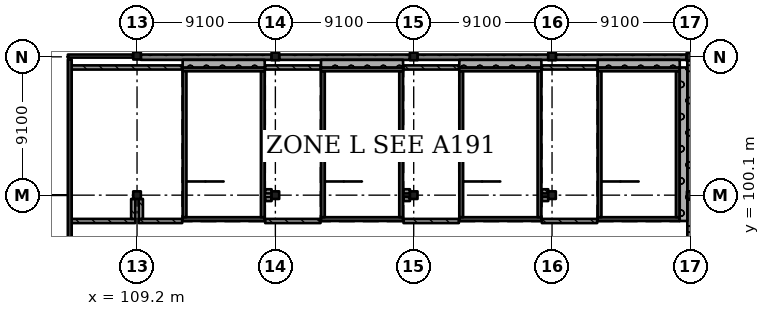
"""IFC4 building model, lengths in metres.
Left out: names, types, materials, properties, quantities, classifications, styles, units other than length and angle.
Written with IfcOpenShell. Run it as: python <this file> out.ifc"""

import sys

from ifc_helpers import new_model, si_unit, direction, frame, frame_2d, origin, origin_2d, place, context, subcontext, project, spatial, rectangle, extrude, element, fill, save


model = new_model("IFC4")
c1 = context("Model", 3, precision=1e-05, world=origin(), true_north=direction((0.0, 1.0)))
c2 = subcontext(c1, "Body", "Model", "MODEL_VIEW")
j1 = project(units=[si_unit("LENGTHUNIT", "METRE"), si_unit("PLANEANGLEUNIT", "RADIAN")], contexts=[c1])
p1 = place(None, origin())
s1 = spatial("IfcSite", under=j1, at=p1, CompositionType="ELEMENT")
p2 = place(p1, origin())
s2 = spatial("IfcBuilding", under=s1, at=p2, CompositionType="ELEMENT")
p3 = place(p2, frame((0.0, 0.0, 29.12)))
s3 = spatial("IfcBuildingStorey", under=s2, at=p3, CompositionType="ELEMENT", Elevation=29.12)
for number, where, z_axis, x_axis in (
    (1, (109.2, 100.1, 0.0), (0.0, 0.0, 1.0), (1.0, 0.0, 0.0)),
    (2, (109.2, 109.275, 0.0), (0.0, 0.0, 1.0), (1.0, 0.0, 0.0)),
    (3, (118.3, 100.1, 0.0), (0.0, 0.0, 1.0), (1.0, 0.0, 0.0)),
    (4, (118.3, 109.225, 0.0), (0.0, 0.0, 1.0), (1.0, 0.0, 0.0)),
    (5, (127.4, 100.1, 0.0), (0.0, 0.0, 1.0), (1.0, 0.0, 0.0)),
    (6, (127.4, 109.225, 0.0), (0.0, 0.0, 1.0), (1.0, 0.0, 0.0)),
    (7, (136.5, 100.1, 0.0), (0.0, 0.0, 1.0), (1.0, 0.0, 0.0)),
    (8, (136.5, 109.225, 0.0), (0.0, 0.0, 1.0), (1.0, 0.0, 0.0)),
    (9, (145.625, 100.1, 0.0), (0.0, 0.0, 1.0), (1.0, 0.0, 0.0)),
    (10, (145.6, 109.2, 0.0), (0.0, 0.0, 1.0), (1.0, 0.0, 0.0)),
):
    element("IfcColumn", number, at=place(p3, frame(where, z_axis=z_axis, x_axis=x_axis)), inside=s3, PredefinedType="COLUMN", context=c2, shape_type="SweptSolid", body=[
        extrude(rectangle(XDim=0.5, YDim=0.5, at=origin_2d()), origin(), (0.0, 0.0, 1.0), 4.55),
    ])
p4 = place(p3, frame((104.775, 68.25, 0.0), z_axis=(0.0, 0.0, 1.0), x_axis=(0.0, 1.0, 0.0)))
e11 = element("IfcWall", 11, at=p4, inside=s3, PredefinedType="SHEAR", context=c2, shape_type="SweptSolid", body=[
    extrude(rectangle(XDim=40.775, YDim=0.25, at=frame_2d((20.387, 0.0))), origin(), (0.0, 0.0, 1.0), 4.55),
])
p5 = place(p3, frame((144.9, 98.525, 0.0), z_axis=(0.0, 0.0, 1.0), x_axis=(-1.0, 0.0, 0.0)))
e12 = element("IfcWall", 12, at=p5, inside=s3, PredefinedType="SHEAR", context=c2, shape_type="SweptSolid", body=[
    extrude(rectangle(XDim=5.4, YDim=0.25, at=frame_2d((2.7, 0.0))), origin(), (0.0, 0.0, 1.0), 4.55),
])
p6 = place(p5, frame((1.5, 0.0, 0.0)))
e13 = element("IfcOpeningElement", 13, at=p6, cuts=e12, PredefinedType="OPENING", context=c2, shape_type="SweptSolid", body=[
    extrude(rectangle(XDim=2.4, YDim=2.1, at=frame_2d((1.2, 1.05))), frame((0.0, 0.135, 0.0), z_axis=(0.0, -1.0, 0.0), x_axis=(1.0, 0.0, 0.0)), (0.0, 0.0, 1.0), 0.27),
])
p7 = place(p3, frame((144.9, 108.375, 0.0), z_axis=(0.0, 0.0, 1.0), x_axis=(-1.0, 0.0, 0.0)))
e14 = element("IfcWall", 14, at=p7, inside=s3, PredefinedType="SHEAR", context=c2, shape_type="SweptSolid", body=[
    extrude(rectangle(XDim=5.4, YDim=0.25, at=frame_2d((2.7, 0.0))), origin(), (0.0, 0.0, 1.0), 4.55),
])
for number, where, z_axis, x_axis in (
    (15, (139.625, 108.25, 0.0), (0.0, 0.0, 1.0), (0.0, -1.0, 0.0)),
    (16, (144.775, 108.25, 0.0), (0.0, 0.0, 1.0), (0.0, -1.0, 0.0)),
):
    element("IfcWall", number, at=place(p3, frame(where, z_axis=z_axis, x_axis=x_axis)), inside=s3, PredefinedType="SHEAR", context=c2, shape_type="SweptSolid", body=[
        extrude(rectangle(XDim=9.6, YDim=0.25, at=frame_2d((4.8, 0.0))), origin(), (0.0, 0.0, 1.0), 4.55),
    ])
p8 = place(p3, frame((135.8, 98.525, 0.0), z_axis=(0.0, 0.0, 1.0), x_axis=(-1.0, 0.0, 0.0)))
e17 = element("IfcWall", 17, at=p8, inside=s3, PredefinedType="SHEAR", context=c2, shape_type="SweptSolid", body=[
    extrude(rectangle(XDim=5.4, YDim=0.25, at=frame_2d((2.7, 0.0))), origin(), (0.0, 0.0, 1.0), 4.55),
])
p9 = place(p8, frame((1.5, 0.0, 0.0)))
e18 = element("IfcOpeningElement", 18, at=p9, cuts=e17, PredefinedType="OPENING", context=c2, shape_type="SweptSolid", body=[
    extrude(rectangle(XDim=2.4, YDim=2.1, at=frame_2d((1.2, 1.05))), frame((0.0, 0.135, 0.0), z_axis=(0.0, -1.0, 0.0), x_axis=(1.0, 0.0, 0.0)), (0.0, 0.0, 1.0), 0.27),
])
p10 = place(p3, frame((135.8, 108.375, 0.0), z_axis=(0.0, 0.0, 1.0), x_axis=(-1.0, 0.0, 0.0)))
e19 = element("IfcWall", 19, at=p10, inside=s3, PredefinedType="SHEAR", context=c2, shape_type="SweptSolid", body=[
    extrude(rectangle(XDim=5.4, YDim=0.25, at=frame_2d((2.7, 0.0))), origin(), (0.0, 0.0, 1.0), 4.55),
])
for number, where, z_axis, x_axis in (
    (20, (130.525, 108.25, 0.0), (0.0, 0.0, 1.0), (0.0, -1.0, 0.0)),
    (21, (135.675, 108.25, 0.0), (0.0, 0.0, 1.0), (0.0, -1.0, 0.0)),
):
    element("IfcWall", number, at=place(p3, frame(where, z_axis=z_axis, x_axis=x_axis)), inside=s3, PredefinedType="SHEAR", context=c2, shape_type="SweptSolid", body=[
        extrude(rectangle(XDim=9.6, YDim=0.25, at=frame_2d((4.8, 0.0))), origin(), (0.0, 0.0, 1.0), 4.55),
    ])
p11 = place(p3, frame((126.7, 98.525, 0.0), z_axis=(0.0, 0.0, 1.0), x_axis=(-1.0, 0.0, 0.0)))
e22 = element("IfcWall", 22, at=p11, inside=s3, PredefinedType="SHEAR", context=c2, shape_type="SweptSolid", body=[
    extrude(rectangle(XDim=5.4, YDim=0.25, at=frame_2d((2.7, 0.0))), origin(), (0.0, 0.0, 1.0), 4.55),
])
p12 = place(p11, frame((1.5, 0.0, 0.0)))
e23 = element("IfcOpeningElement", 23, at=p12, cuts=e22, PredefinedType="OPENING", context=c2, shape_type="SweptSolid", body=[
    extrude(rectangle(XDim=2.4, YDim=2.1, at=frame_2d((1.2, 1.05))), frame((0.0, 0.135, 0.0), z_axis=(0.0, -1.0, 0.0), x_axis=(1.0, 0.0, 0.0)), (0.0, 0.0, 1.0), 0.27),
])
p13 = place(p3, frame((126.7, 108.375, 0.0), z_axis=(0.0, 0.0, 1.0), x_axis=(-1.0, 0.0, 0.0)))
e24 = element("IfcWall", 24, at=p13, inside=s3, PredefinedType="SHEAR", context=c2, shape_type="SweptSolid", body=[
    extrude(rectangle(XDim=5.4, YDim=0.25, at=frame_2d((2.7, 0.0))), origin(), (0.0, 0.0, 1.0), 4.55),
])
for number, where, z_axis, x_axis in (
    (25, (121.425, 108.25, 0.0), (0.0, 0.0, 1.0), (0.0, -1.0, 0.0)),
    (26, (126.575, 108.25, 0.0), (0.0, 0.0, 1.0), (0.0, -1.0, 0.0)),
):
    element("IfcWall", number, at=place(p3, frame(where, z_axis=z_axis, x_axis=x_axis)), inside=s3, PredefinedType="SHEAR", context=c2, shape_type="SweptSolid", body=[
        extrude(rectangle(XDim=9.6, YDim=0.25, at=frame_2d((4.8, 0.0))), origin(), (0.0, 0.0, 1.0), 4.55),
    ])
p14 = place(p3, frame((117.6, 98.525, 0.0), z_axis=(0.0, 0.0, 1.0), x_axis=(-1.0, 0.0, 0.0)))
e27 = element("IfcWall", 27, at=p14, inside=s3, PredefinedType="SHEAR", context=c2, shape_type="SweptSolid", body=[
    extrude(rectangle(XDim=5.4, YDim=0.25, at=frame_2d((2.7, 0.0))), origin(), (0.0, 0.0, 1.0), 4.55),
])
p15 = place(p14, frame((1.5, 0.0, 0.0)))
e28 = element("IfcOpeningElement", 28, at=p15, cuts=e27, PredefinedType="OPENING", context=c2, shape_type="SweptSolid", body=[
    extrude(rectangle(XDim=2.4, YDim=2.1, at=frame_2d((1.2, 1.05))), frame((0.0, 0.135, 0.0), z_axis=(0.0, -1.0, 0.0), x_axis=(1.0, 0.0, 0.0)), (0.0, 0.0, 1.0), 0.27),
])
p16 = place(p3, frame((117.6, 108.375, 0.0), z_axis=(0.0, 0.0, 1.0), x_axis=(-1.0, 0.0, 0.0)))
e29 = element("IfcWall", 29, at=p16, inside=s3, PredefinedType="SHEAR", context=c2, shape_type="SweptSolid", body=[
    extrude(rectangle(XDim=5.4, YDim=0.25, at=frame_2d((2.7, 0.0))), origin(), (0.0, 0.0, 1.0), 4.55),
])
for number, where, z_axis, x_axis in (
    (30, (112.325, 108.25, 0.0), (0.0, 0.0, 1.0), (0.0, -1.0, 0.0)),
    (31, (117.475, 108.25, 0.0), (0.0, 0.0, 1.0), (0.0, -1.0, 0.0)),
):
    element("IfcWall", number, at=place(p3, frame(where, z_axis=z_axis, x_axis=x_axis)), inside=s3, PredefinedType="SHEAR", context=c2, shape_type="SweptSolid", body=[
        extrude(rectangle(XDim=9.6, YDim=0.25, at=frame_2d((4.8, 0.0))), origin(), (0.0, 0.0, 1.0), 4.55),
    ])
p17 = place(p3, frame((145.575, 91.25, 0.0), z_axis=(0.0, 0.0, 1.0), x_axis=(0.0, 1.0, 0.0)))
e32 = element("IfcWall", 32, at=p17, inside=s3, PredefinedType="SOLIDWALL", context=c2, shape_type="SweptSolid", body=[
    extrude(rectangle(XDim=8.6, YDim=0.35, at=frame_2d((4.3, 0.0))), origin(), (0.0, 0.0, 1.0), 4.5),
])
p18 = place(p3, frame((145.575, 100.35, 0.0), z_axis=(0.0, 0.0, 1.0), x_axis=(0.0, 1.0, 0.0)))
e33 = element("IfcWall", 33, at=p18, inside=s3, PredefinedType="SOLIDWALL", context=c2, shape_type="SweptSolid", body=[
    extrude(rectangle(XDim=8.6, YDim=0.35, at=frame_2d((4.3, 0.0))), origin(), (0.0, 0.0, 1.0), 4.5),
])
for number, where, z_axis, x_axis in (
    (34, (145.35, 109.175, 0.0), (0.0, 0.0, 1.0), (-1.0, 0.0, 0.0)),
    (35, (136.25, 109.175, 0.0), (0.0, 0.0, 1.0), (-1.0, 0.0, 0.0)),
):
    element("IfcWall", number, at=place(p3, frame(where, z_axis=z_axis, x_axis=x_axis)), inside=s3, PredefinedType="SOLIDWALL", context=c2, shape_type="SweptSolid", body=[
        extrude(rectangle(XDim=8.6, YDim=0.35, at=frame_2d((4.3, 0.0))), origin(), (0.0, 0.0, 1.0), 4.5),
    ])
p19 = place(p3, frame((127.15, 109.175, 0.0), z_axis=(0.0, 0.0, 1.0), x_axis=(-1.0, 0.0, 0.0)))
e36 = element("IfcWall", 36, at=p19, inside=s3, PredefinedType="SOLIDWALL", context=c2, shape_type="SweptSolid", body=[
    extrude(rectangle(XDim=8.6, YDim=0.35, at=frame_2d((4.3, 0.0))), origin(), (0.0, 0.0, 1.0), 4.5),
])
p20 = place(p3, frame((118.05, 109.175, 0.0), z_axis=(0.0, 0.0, 1.0), x_axis=(-1.0, 0.0, 0.0)))
e37 = element("IfcWall", 37, at=p20, inside=s3, PredefinedType="SOLIDWALL", context=c2, shape_type="SweptSolid", body=[
    extrude(rectangle(XDim=8.6, YDim=0.35, at=frame_2d((4.3, 0.0))), origin(), (0.0, 0.0, 1.0), 4.5),
])
p21 = place(p3, frame((108.95, 109.25, 0.0), z_axis=(0.0, 0.0, 1.0), x_axis=(-1.0, 0.0, 0.0)))
e38 = element("IfcWall", 38, at=p21, inside=s3, PredefinedType="SOLIDWALL", context=c2, shape_type="SweptSolid", body=[
    extrude(rectangle(XDim=4.3, YDim=0.2, at=frame_2d((2.15, 0.0))), origin(), (0.0, 0.0, 1.0), 4.5),
])
p22 = place(p21, frame((0.65, 0.0, 0.6)))
e39 = element("IfcOpeningElement", 39, at=p22, cuts=e38, PredefinedType="OPENING", context=c2, shape_type="SweptSolid", body=[
    extrude(rectangle(XDim=3.0, YDim=3.0, at=frame_2d((1.5, 1.5))), frame((0.0, 0.11, 0.0), z_axis=(0.0, -1.0, 0.0), x_axis=(1.0, 0.0, 0.0)), (0.0, 0.0, 1.0), 0.22),
])
p23 = place(p3, frame((139.5, 108.75, 0.0), z_axis=(0.0, 0.0, 1.0), x_axis=(1.0, 0.0, 0.0)))
e40 = element("IfcWall", 40, at=p23, inside=s3, PredefinedType="SOLIDWALL", context=c2, shape_type="SweptSolid", body=[
    extrude(rectangle(XDim=5.4, YDim=0.5, at=frame_2d((2.7, 0.0))), origin(), (0.0, 0.0, 1.0), 3.88),
])
p24 = place(p3, frame((145.15, 98.4, 0.0), z_axis=(0.0, 0.0, 1.0), x_axis=(0.0, 1.0, 0.0)))
e41 = element("IfcWall", 41, at=p24, inside=s3, PredefinedType="SOLIDWALL", context=c2, shape_type="SweptSolid", body=[
    extrude(rectangle(XDim=10.1, YDim=0.5, at=frame_2d((5.05, 0.0))), origin(), (0.0, 0.0, 1.0), 4.55),
])
p25 = place(p3, frame((130.4, 108.75, 0.0), z_axis=(0.0, 0.0, 1.0), x_axis=(1.0, 0.0, 0.0)))
e42 = element("IfcWall", 42, at=p25, inside=s3, PredefinedType="SOLIDWALL", context=c2, shape_type="SweptSolid", body=[
    extrude(rectangle(XDim=5.4, YDim=0.5, at=frame_2d((2.7, 0.0))), origin(), (0.0, 0.0, 1.0), 3.88),
])
p26 = place(p3, frame((121.3, 108.75, 0.0), z_axis=(0.0, 0.0, 1.0), x_axis=(1.0, 0.0, 0.0)))
e43 = element("IfcWall", 43, at=p26, inside=s3, PredefinedType="SOLIDWALL", context=c2, shape_type="SweptSolid", body=[
    extrude(rectangle(XDim=5.4, YDim=0.5, at=frame_2d((2.7, 0.0))), origin(), (0.0, 0.0, 1.0), 3.88),
])
p27 = place(p3, frame((112.2, 108.75, 0.0), z_axis=(0.0, 0.0, 1.0), x_axis=(1.0, 0.0, 0.0)))
e44 = element("IfcWall", 44, at=p27, inside=s3, PredefinedType="SOLIDWALL", context=c2, shape_type="SweptSolid", body=[
    extrude(rectangle(XDim=5.4, YDim=0.5, at=frame_2d((2.7, 0.0))), origin(), (0.0, 0.0, 1.0), 3.88),
])
p28 = place(p3, frame((104.9, 98.4, 0.0), z_axis=(0.0, 0.0, 1.0), x_axis=(1.0, 0.0, 0.0)))
e45 = element("IfcWall", 45, at=p28, inside=s3, PredefinedType="SOLIDWALL", context=c2, shape_type="SweptSolid", body=[
    extrude(rectangle(XDim=4.188, YDim=0.275, at=frame_2d((2.094, 0.0))), origin(), (0.0, 0.0, 1.0), 3.88),
])
p29 = place(p28, frame((1.45, 0.0, 0.0)))
e46 = element("IfcOpeningElement", 46, at=p29, cuts=e45, PredefinedType="OPENING", context=c2, shape_type="SweptSolid", body=[
    extrude(rectangle(XDim=1.2, YDim=2.4, at=frame_2d((0.6, 1.2))), frame((0.0, 0.147, 0.0), z_axis=(0.0, -1.0, 0.0), x_axis=(1.0, 0.0, 0.0)), (0.0, 0.0, 1.0), 0.295),
])
p30 = place(p3, frame((104.9, 108.5, 0.0), z_axis=(0.0, 0.0, 1.0), x_axis=(1.0, 0.0, 0.0)))
e47 = element("IfcWall", 47, at=p30, inside=s3, PredefinedType="SOLIDWALL", context=c2, shape_type="SweptSolid", body=[
    extrude(rectangle(XDim=7.27, YDim=0.275, at=frame_2d((3.635, 0.0))), origin(), (0.0, 0.0, 1.0), 3.88),
])
p31 = place(p3, frame((108.95, 98.538, 0.0), z_axis=(0.0, 0.0, 1.0), x_axis=(0.0, 1.0, 0.0)))
e48 = element("IfcWall", 48, at=p31, inside=s3, PredefinedType="SOLIDWALL", context=c2, shape_type="SweptSolid", body=[
    extrude(rectangle(XDim=1.312, YDim=0.275, at=frame_2d((0.656, 0.0))), origin(), (0.0, 0.0, 1.0), 3.88),
])
p32 = place(p3, frame((109.312, 98.4, 0.0), z_axis=(0.0, 0.0, 1.0), x_axis=(1.0, 0.0, 0.0)))
e49 = element("IfcWall", 49, at=p32, inside=s3, PredefinedType="SOLIDWALL", context=c2, shape_type="SweptSolid", body=[
    extrude(rectangle(XDim=2.857, YDim=0.275, at=frame_2d((1.429, 0.0))), origin(), (0.0, 0.0, 1.0), 3.88),
])
p33 = place(p3, frame((109.45, 99.85, 0.0), z_axis=(0.0, 0.0, 1.0), x_axis=(0.0, -1.0, 0.0)))
e50 = element("IfcWall", 50, at=p33, inside=s3, PredefinedType="SOLIDWALL", context=c2, shape_type="SweptSolid", body=[
    extrude(rectangle(XDim=1.312, YDim=0.275, at=frame_2d((0.656, 0.0))), origin(), (0.0, 0.0, 1.0), 3.88),
])
p34 = place(p3, frame((117.63, 98.4, 0.0), z_axis=(0.0, 0.0, 1.0), x_axis=(1.0, 0.0, 0.0)))
e51 = element("IfcWall", 51, at=p34, inside=s3, PredefinedType="SOLIDWALL", context=c2, shape_type="SweptSolid", body=[
    extrude(rectangle(XDim=3.64, YDim=0.275, at=frame_2d((1.82, 0.0))), origin(), (0.0, 0.0, 1.0), 3.88),
])
p35 = place(p34, frame((1.25, 0.0, 0.0)))
e52 = element("IfcOpeningElement", 52, at=p35, cuts=e51, PredefinedType="OPENING", context=c2, shape_type="SweptSolid", body=[
    extrude(rectangle(XDim=1.2, YDim=2.4, at=frame_2d((0.6, 1.2))), frame((0.0, 0.147, 0.0), z_axis=(0.0, -1.0, 0.0), x_axis=(1.0, 0.0, 0.0)), (0.0, 0.0, 1.0), 0.295),
])
p36 = place(p3, frame((117.63, 99.85, 0.0), z_axis=(0.0, 0.0, 1.0), x_axis=(1.0, 0.0, 0.0)))
e53 = element("IfcWall", 53, at=p36, inside=s3, PredefinedType="SOLIDWALL", context=c2, shape_type="SweptSolid", body=[
    extrude(rectangle(XDim=0.42, YDim=0.275, at=frame_2d((0.21, 0.0))), origin(), (0.0, 0.0, 1.0), 3.88),
])
p37 = place(p3, frame((117.63, 108.5, 0.0), z_axis=(0.0, 0.0, 1.0), x_axis=(1.0, 0.0, 0.0)))
e54 = element("IfcWall", 54, at=p37, inside=s3, PredefinedType="SOLIDWALL", context=c2, shape_type="SweptSolid", body=[
    extrude(rectangle(XDim=3.64, YDim=0.275, at=frame_2d((1.82, 0.0))), origin(), (0.0, 0.0, 1.0), 3.88),
])
p38 = place(p3, frame((118.05, 100.35, 0.0), z_axis=(0.0, 0.0, 1.0), x_axis=(-1.0, 0.0, 0.0)))
e55 = element("IfcWall", 55, at=p38, inside=s3, PredefinedType="SOLIDWALL", context=c2, shape_type="SweptSolid", body=[
    extrude(rectangle(XDim=0.42, YDim=0.275, at=frame_2d((0.21, 0.0))), origin(), (0.0, 0.0, 1.0), 3.88),
])
p39 = place(p3, frame((126.73, 98.4, 0.0), z_axis=(0.0, 0.0, 1.0), x_axis=(1.0, 0.0, 0.0)))
e56 = element("IfcWall", 56, at=p39, inside=s3, PredefinedType="SOLIDWALL", context=c2, shape_type="SweptSolid", body=[
    extrude(rectangle(XDim=3.64, YDim=0.275, at=frame_2d((1.82, 0.0))), origin(), (0.0, 0.0, 1.0), 3.88),
])
p40 = place(p39, frame((1.25, 0.0, 0.0)))
e57 = element("IfcOpeningElement", 57, at=p40, cuts=e56, PredefinedType="OPENING", context=c2, shape_type="SweptSolid", body=[
    extrude(rectangle(XDim=1.2, YDim=2.4, at=frame_2d((0.6, 1.2))), frame((0.0, 0.147, 0.0), z_axis=(0.0, -1.0, 0.0), x_axis=(1.0, 0.0, 0.0)), (0.0, 0.0, 1.0), 0.295),
])
p41 = place(p3, frame((126.73, 99.85, 0.0), z_axis=(0.0, 0.0, 1.0), x_axis=(1.0, 0.0, 0.0)))
e58 = element("IfcWall", 58, at=p41, inside=s3, PredefinedType="SOLIDWALL", context=c2, shape_type="SweptSolid", body=[
    extrude(rectangle(XDim=0.42, YDim=0.275, at=frame_2d((0.21, 0.0))), origin(), (0.0, 0.0, 1.0), 3.88),
])
p42 = place(p3, frame((126.73, 108.5, 0.0), z_axis=(0.0, 0.0, 1.0), x_axis=(1.0, 0.0, 0.0)))
e59 = element("IfcWall", 59, at=p42, inside=s3, PredefinedType="SOLIDWALL", context=c2, shape_type="SweptSolid", body=[
    extrude(rectangle(XDim=3.64, YDim=0.275, at=frame_2d((1.82, 0.0))), origin(), (0.0, 0.0, 1.0), 3.88),
])
p43 = place(p3, frame((127.15, 100.35, 0.0), z_axis=(0.0, 0.0, 1.0), x_axis=(-1.0, 0.0, 0.0)))
e60 = element("IfcWall", 60, at=p43, inside=s3, PredefinedType="SOLIDWALL", context=c2, shape_type="SweptSolid", body=[
    extrude(rectangle(XDim=0.42, YDim=0.275, at=frame_2d((0.21, 0.0))), origin(), (0.0, 0.0, 1.0), 3.88),
])
p44 = place(p3, frame((135.83, 98.4, 0.0), z_axis=(0.0, 0.0, 1.0), x_axis=(1.0, 0.0, 0.0)))
e61 = element("IfcWall", 61, at=p44, inside=s3, PredefinedType="SOLIDWALL", context=c2, shape_type="SweptSolid", body=[
    extrude(rectangle(XDim=3.64, YDim=0.275, at=frame_2d((1.82, 0.0))), origin(), (0.0, 0.0, 1.0), 3.88),
])
p45 = place(p44, frame((1.25, 0.0, 0.0)))
e62 = element("IfcOpeningElement", 62, at=p45, cuts=e61, PredefinedType="OPENING", context=c2, shape_type="SweptSolid", body=[
    extrude(rectangle(XDim=1.2, YDim=2.4, at=frame_2d((0.6, 1.2))), frame((0.0, 0.147, 0.0), z_axis=(0.0, -1.0, 0.0), x_axis=(1.0, 0.0, 0.0)), (0.0, 0.0, 1.0), 0.295),
])
p46 = place(p3, frame((135.83, 99.85, 0.0), z_axis=(0.0, 0.0, 1.0), x_axis=(1.0, 0.0, 0.0)))
e63 = element("IfcWall", 63, at=p46, inside=s3, PredefinedType="SOLIDWALL", context=c2, shape_type="SweptSolid", body=[
    extrude(rectangle(XDim=0.42, YDim=0.275, at=frame_2d((0.21, 0.0))), origin(), (0.0, 0.0, 1.0), 3.88),
])
p47 = place(p3, frame((135.83, 108.5, 0.0), z_axis=(0.0, 0.0, 1.0), x_axis=(1.0, 0.0, 0.0)))
e64 = element("IfcWall", 64, at=p47, inside=s3, PredefinedType="SOLIDWALL", context=c2, shape_type="SweptSolid", body=[
    extrude(rectangle(XDim=3.64, YDim=0.275, at=frame_2d((1.82, 0.0))), origin(), (0.0, 0.0, 1.0), 3.88),
])
p48 = place(p3, frame((136.25, 100.35, 0.0), z_axis=(0.0, 0.0, 1.0), x_axis=(-1.0, 0.0, 0.0)))
e65 = element("IfcWall", 65, at=p48, inside=s3, PredefinedType="SOLIDWALL", context=c2, shape_type="SweptSolid", body=[
    extrude(rectangle(XDim=0.42, YDim=0.275, at=frame_2d((0.21, 0.0))), origin(), (0.0, 0.0, 1.0), 3.88),
])
p49 = place(p22, origin())
e66 = element("IfcWindow", 66, at=p49, inside=s3, PartitioningType="SINGLE_PANEL", PredefinedType="WINDOW", context=c2, shape_type="SweptSolid", body=[
    extrude(rectangle(XDim=3.0, YDim=3.0, at=frame_2d((1.5, 1.5))), frame((0.0, 0.03, 0.0), z_axis=(0.0, -1.0, 0.0), x_axis=(1.0, 0.0, 0.0)), (0.0, 0.0, 1.0), 0.06),
])
fill(e39, e66)
p50 = place(p45, origin())
e67 = element("IfcDoor", 67, at=p50, inside=s3, OperationType="SINGLE_SWING_LEFT", PredefinedType="DOOR", context=c2, shape_type="SweptSolid", body=[
    extrude(rectangle(XDim=1.2, YDim=2.4, at=frame_2d((0.6, 1.2))), frame((0.0, 0.025, 0.0), z_axis=(0.0, -1.0, 0.0), x_axis=(1.0, 0.0, 0.0)), (0.0, 0.0, 1.0), 0.05),
])
fill(e62, e67)
p51 = place(p40, origin())
e68 = element("IfcDoor", 68, at=p51, inside=s3, OperationType="SINGLE_SWING_LEFT", PredefinedType="DOOR", context=c2, shape_type="SweptSolid", body=[
    extrude(rectangle(XDim=1.2, YDim=2.4, at=frame_2d((0.6, 1.2))), frame((0.0, 0.025, 0.0), z_axis=(0.0, -1.0, 0.0), x_axis=(1.0, 0.0, 0.0)), (0.0, 0.0, 1.0), 0.05),
])
fill(e57, e68)
p52 = place(p35, origin())
e69 = element("IfcDoor", 69, at=p52, inside=s3, OperationType="SINGLE_SWING_LEFT", PredefinedType="DOOR", context=c2, shape_type="SweptSolid", body=[
    extrude(rectangle(XDim=1.2, YDim=2.4, at=frame_2d((0.6, 1.2))), frame((0.0, 0.025, 0.0), z_axis=(0.0, -1.0, 0.0), x_axis=(1.0, 0.0, 0.0)), (0.0, 0.0, 1.0), 0.05),
])
fill(e52, e69)
p53 = place(p29, origin())
e70 = element("IfcDoor", 70, at=p53, inside=s3, OperationType="SINGLE_SWING_RIGHT", PredefinedType="DOOR", context=c2, shape_type="SweptSolid", body=[
    extrude(rectangle(XDim=1.2, YDim=2.4, at=frame_2d((0.6, 1.2))), frame((0.0, 0.025, 0.0), z_axis=(0.0, -1.0, 0.0), x_axis=(1.0, 0.0, 0.0)), (0.0, 0.0, 1.0), 0.05),
])
fill(e46, e70)
p54 = place(p6, origin())
e71 = element("IfcDoor", 71, at=p54, inside=s3, OperationType="DOUBLE_DOOR_SINGLE_SWING", PredefinedType="DOOR", context=c2, shape_type="SweptSolid", body=[
    extrude(rectangle(XDim=2.4, YDim=2.1, at=frame_2d((1.2, 1.05))), frame((0.0, 0.025, 0.0), z_axis=(0.0, -1.0, 0.0), x_axis=(1.0, 0.0, 0.0)), (0.0, 0.0, 1.0), 0.05),
])
fill(e13, e71)
p55 = place(p9, origin())
e72 = element("IfcDoor", 72, at=p55, inside=s3, OperationType="DOUBLE_DOOR_SINGLE_SWING", PredefinedType="DOOR", context=c2, shape_type="SweptSolid", body=[
    extrude(rectangle(XDim=2.4, YDim=2.1, at=frame_2d((1.2, 1.05))), frame((0.0, 0.025, 0.0), z_axis=(0.0, -1.0, 0.0), x_axis=(1.0, 0.0, 0.0)), (0.0, 0.0, 1.0), 0.05),
])
fill(e18, e72)
p56 = place(p12, origin())
e73 = element("IfcDoor", 73, at=p56, inside=s3, OperationType="DOUBLE_DOOR_SINGLE_SWING", PredefinedType="DOOR", context=c2, shape_type="SweptSolid", body=[
    extrude(rectangle(XDim=2.4, YDim=2.1, at=frame_2d((1.2, 1.05))), frame((0.0, 0.025, 0.0), z_axis=(0.0, -1.0, 0.0), x_axis=(1.0, 0.0, 0.0)), (0.0, 0.0, 1.0), 0.05),
])
fill(e23, e73)
p57 = place(p15, origin())
e74 = element("IfcDoor", 74, at=p57, inside=s3, OperationType="DOUBLE_DOOR_SINGLE_SWING", PredefinedType="DOOR", context=c2, shape_type="SweptSolid", body=[
    extrude(rectangle(XDim=2.4, YDim=2.1, at=frame_2d((1.2, 1.05))), frame((0.0, 0.025, 0.0), z_axis=(0.0, -1.0, 0.0), x_axis=(1.0, 0.0, 0.0)), (0.0, 0.0, 1.0), 0.05),
])
fill(e28, e74)
save(model, sys.argv[1])
